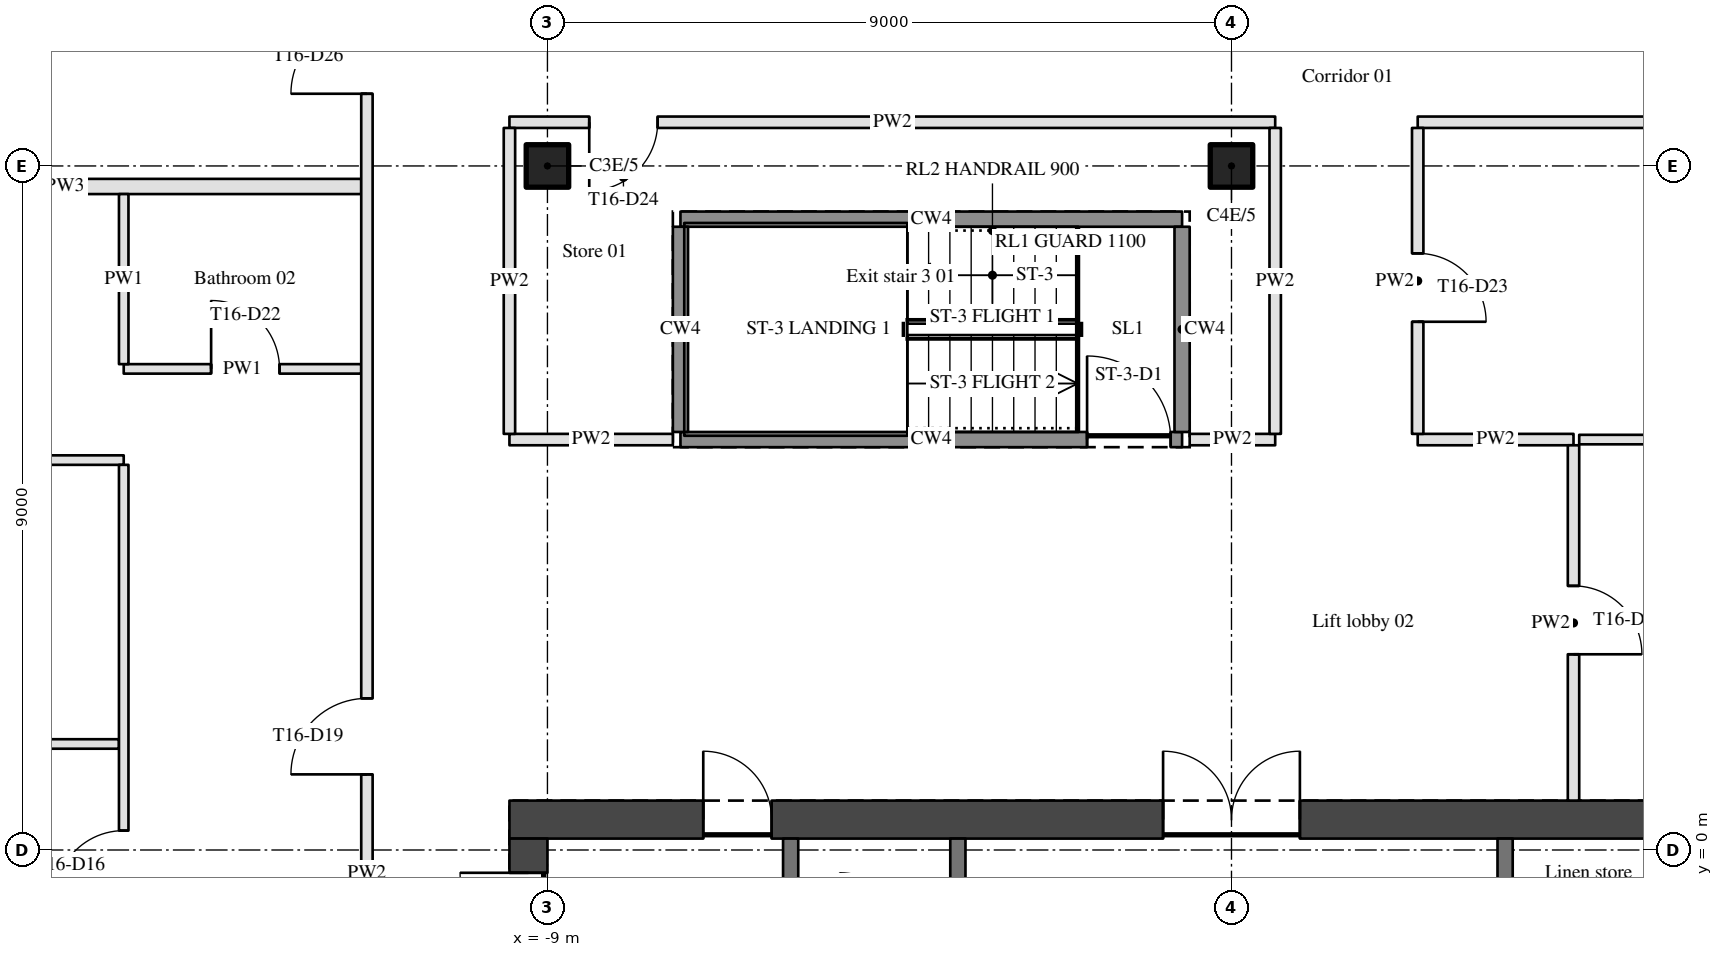
"""IFC4 building model, lengths in metres.
Left out: names, types, materials, properties, quantities, classifications, styles, units other than length and angle.
Written with IfcOpenShell. Run it as: python <this file> out.ifc"""

import sys

from ifc_helpers import new_model, si_unit, direction, frame, frame_2d, origin, origin_2d, place, context, subcontext, project, spatial, rectangle, hollow_circle, extrude, element, fill, save


model = new_model("IFC4")
c1 = context("Model", 3, precision=1e-05, world=origin(), true_north=direction((0.0, 1.0)))
c2 = subcontext(c1, "Body", "Model", "MODEL_VIEW")
j1 = project(units=[si_unit("LENGTHUNIT", "METRE"), si_unit("PLANEANGLEUNIT", "RADIAN")], contexts=[c1])
p1 = place(None, origin())
s1 = spatial("IfcSite", under=j1, at=p1, CompositionType="ELEMENT")
p2 = place(p1, origin())
s2 = spatial("IfcBuilding", under=s1, at=p2, CompositionType="ELEMENT")
p3 = place(p2, frame((0.0, 0.0, 217.2)))
s3 = spatial("IfcBuildingStorey", under=s2, at=p3, CompositionType="ELEMENT", Elevation=217.2)
for number, where, z_axis, x_axis in (
    (1, (-9.0, 9.0, 0.0), (0.0, 0.0, 1.0), (1.0, 0.0, 0.0)),
    (2, (0.0, 9.0, 0.0), (0.0, 0.0, 1.0), (1.0, 0.0, 0.0)),
):
    element("IfcColumn", number, at=place(p3, frame(where, z_axis=z_axis, x_axis=x_axis)), inside=s3, PredefinedType="COLUMN", context=c2, shape_type="SweptSolid", body=[
        extrude(hollow_circle(Radius=0.28, WallThickness=0.025, at=origin_2d()), origin(), (0.0, 0.0, 1.0), 3.15),
    ])
p4 = place(p3, frame((-9.5, 0.4, 0.0), z_axis=(0.0, 0.0, 1.0), x_axis=(1.0, 0.0, 0.0)))
e3 = element("IfcWall", 3, at=p4, inside=s3, PredefinedType="SHEAR", context=c2, shape_type="SweptSolid", body=[
    extrude(rectangle(XDim=19.0, YDim=0.5, at=frame_2d((9.5, 0.0))), origin(), (0.0, 0.0, 1.0), 3.15),
])
p5 = place(p4, frame((8.6, 0.0, 0.0)))
e4 = element("IfcOpeningElement", 4, at=p5, cuts=e3, PredefinedType="OPENING", context=c2, shape_type="SweptSolid", body=[
    extrude(rectangle(XDim=1.8, YDim=2.1, at=frame_2d((0.9, 1.05))), frame((0.0, 0.26, 0.0), z_axis=(0.0, -1.0, 0.0), x_axis=(1.0, 0.0, 0.0)), (0.0, 0.0, 1.0), 0.52),
])
p6 = place(p4, frame((2.55, 0.0, 0.0)))
e5 = element("IfcOpeningElement", 5, at=p6, cuts=e3, PredefinedType="OPENING", context=c2, shape_type="SweptSolid", body=[
    extrude(rectangle(XDim=0.9, YDim=2.1, at=frame_2d((0.45, 1.05))), frame((0.0, 0.26, 0.0), z_axis=(0.0, -1.0, 0.0), x_axis=(1.0, 0.0, 0.0)), (0.0, 0.0, 1.0), 0.52),
])
p7 = place(p3, frame((-9.25, -11.5, 0.0), z_axis=(0.0, 0.0, 1.0), x_axis=(0.0, 1.0, 0.0)))
e6 = element("IfcWall", 6, at=p7, inside=s3, PredefinedType="SHEAR", context=c2, shape_type="SweptSolid", body=[
    extrude(rectangle(XDim=11.65, YDim=0.5, at=frame_2d((5.825, 0.0))), origin(), (0.0, 0.0, 1.0), 3.15),
])
p8 = place(p7, frame((9.4, 0.0, 0.0)))
e7 = element("IfcOpeningElement", 7, at=p8, cuts=e6, PredefinedType="OPENING", context=c2, shape_type="SweptSolid", body=[
    extrude(rectangle(XDim=1.8, YDim=2.1, at=frame_2d((0.9, 1.05))), frame((0.0, 0.26, 0.0), z_axis=(0.0, -1.0, 0.0), x_axis=(1.0, 0.0, 0.0)), (0.0, 0.0, 1.0), 0.52),
])
p9 = place(p3, frame((-19.241, 1.395, 0.0), z_axis=(0.0, 0.0, 1.0), x_axis=(1.0, 0.0, 0.0)))
e8 = element("IfcWall", 8, at=p9, inside=s3, PredefinedType="PARTITIONING", context=c2, shape_type="SweptSolid", body=[
    extrude(rectangle(XDim=4.604, YDim=0.125, at=frame_2d((2.302, 0.0))), origin(), (0.0, 0.0, 1.0), 2.21),
])
p10 = place(p3, frame((-14.575, 5.13, 0.0), z_axis=(0.0, 0.0, 1.0), x_axis=(-1.0, 0.0, 0.0)))
e9 = element("IfcWall", 9, at=p10, inside=s3, PredefinedType="PARTITIONING", context=c2, shape_type="SweptSolid", body=[
    extrude(rectangle(XDim=7.36, YDim=0.125, at=frame_2d((3.68, 0.0))), origin(), (0.0, 0.0, 1.0), 2.21),
])
p11 = place(p10, frame((3.23, 0.0, 0.0)))
e10 = element("IfcOpeningElement", 10, at=p11, cuts=e9, PredefinedType="OPENING", context=c2, shape_type="SweptSolid", body=[
    extrude(rectangle(XDim=0.9, YDim=2.1, at=frame_2d((0.45, 1.05))), frame((0.0, 0.073, 0.0), z_axis=(0.0, -1.0, 0.0), x_axis=(1.0, 0.0, 0.0)), (0.0, 0.0, 1.0), 0.145),
])
p12 = place(p3, frame((-9.5, 5.4, 0.0), z_axis=(0.0, 0.0, 1.0), x_axis=(1.0, 0.0, 0.0)))
e11 = element("IfcWall", 11, at=p12, inside=s3, PredefinedType="PARTITIONING", context=c2, shape_type="SweptSolid", body=[
    extrude(rectangle(XDim=2.15, YDim=0.15, at=frame_2d((1.075, 0.0))), origin(), (0.0, 0.0, 1.0), 2.21),
])
p13 = place(p3, frame((-7.25, 5.4, 0.0), z_axis=(0.0, 0.0, 1.0), x_axis=(1.0, 0.0, 0.0)))
e12 = element("IfcWall", 12, at=p13, inside=s3, PredefinedType="SHEAR", context=c2, shape_type="SweptSolid", body=[
    extrude(rectangle(XDim=6.6, YDim=0.2, at=frame_2d((3.3, 0.0))), origin(), (0.0, 0.0, 1.0), 3.15),
])
p14 = place(p13, frame((5.35, 0.0, 0.0)))
e13 = element("IfcOpeningElement", 13, at=p14, cuts=e12, PredefinedType="OPENING", context=c2, shape_type="SweptSolid", body=[
    extrude(rectangle(XDim=1.1, YDim=2.1, at=frame_2d((0.55, 1.05))), frame((0.0, 0.11, 0.0), z_axis=(0.0, -1.0, 0.0), x_axis=(1.0, 0.0, 0.0)), (0.0, 0.0, 1.0), 0.22),
])
p15 = place(p3, frame((-0.55, 5.4, 0.0), z_axis=(0.0, 0.0, 1.0), x_axis=(1.0, 0.0, 0.0)))
e14 = element("IfcWall", 14, at=p15, inside=s3, PredefinedType="PARTITIONING", context=c2, shape_type="SweptSolid", body=[
    extrude(rectangle(XDim=1.125, YDim=0.15, at=frame_2d((0.562, 0.0))), origin(), (0.0, 0.0, 1.0), 2.21),
])
p16 = place(p3, frame((2.45, 5.4, 0.0), z_axis=(0.0, 0.0, 1.0), x_axis=(1.0, 0.0, 0.0)))
e15 = element("IfcWall", 15, at=p16, inside=s3, PredefinedType="PARTITIONING", context=c2, shape_type="SweptSolid", body=[
    extrude(rectangle(XDim=2.05, YDim=0.15, at=frame_2d((1.025, 0.0))), origin(), (0.0, 0.0, 1.0), 2.21),
])
p17 = place(p3, frame((4.575, 5.4, 0.0), z_axis=(0.0, 0.0, 1.0), x_axis=(1.0, 0.0, 0.0)))
e16 = element("IfcWall", 16, at=p17, inside=s3, PredefinedType="PARTITIONING", context=c2, shape_type="SweptSolid", body=[
    extrude(rectangle(XDim=4.863, YDim=0.125, at=frame_2d((2.431, 0.0))), origin(), (0.0, 0.0, 1.0), 2.21),
])
p18 = place(p3, frame((-14.575, 6.33, 0.0), z_axis=(0.0, 0.0, 1.0), x_axis=(1.0, 0.0, 0.0)))
e17 = element("IfcWall", 17, at=p18, inside=s3, PredefinedType="PARTITIONING", context=c2, shape_type="SweptSolid", body=[
    extrude(rectangle(XDim=3.125, YDim=0.125, at=frame_2d((1.562, 0.0))), origin(), (0.0, 0.0, 1.0), 2.21),
])
p19 = place(p18, frame((1.15, 0.0, 0.0)))
e18 = element("IfcOpeningElement", 18, at=p19, cuts=e17, PredefinedType="OPENING", context=c2, shape_type="SweptSolid", body=[
    extrude(rectangle(XDim=0.9, YDim=2.1, at=frame_2d((0.45, 1.05))), frame((0.0, 0.073, 0.0), z_axis=(0.0, -1.0, 0.0), x_axis=(1.0, 0.0, 0.0)), (0.0, 0.0, 1.0), 0.145),
])
p20 = place(p3, frame((-7.25, 8.3, 0.0), z_axis=(0.0, 0.0, 1.0), x_axis=(1.0, 0.0, 0.0)))
e19 = element("IfcWall", 19, at=p20, inside=s3, PredefinedType="SHEAR", context=c2, shape_type="SweptSolid", body=[
    extrude(rectangle(XDim=6.6, YDim=0.2, at=frame_2d((3.3, 0.0))), origin(), (0.0, 0.0, 1.0), 3.15),
])
p21 = place(p3, frame((-19.241, 8.73, 0.0), z_axis=(0.0, 0.0, 1.0), x_axis=(1.0, 0.0, 0.0)))
e20 = element("IfcWall", 20, at=p21, inside=s3, PredefinedType="PARTITIONING", context=c2, shape_type="SweptSolid", body=[
    extrude(rectangle(XDim=7.791, YDim=0.2, at=frame_2d((3.896, 0.0))), origin(), (0.0, 0.0, 1.0), 2.21),
])
p22 = place(p3, frame((0.575, 9.575, 0.0), z_axis=(0.0, 0.0, 1.0), x_axis=(-1.0, 0.0, 0.0)))
e21 = element("IfcWall", 21, at=p22, inside=s3, PredefinedType="PARTITIONING", context=c2, shape_type="SweptSolid", body=[
    extrude(rectangle(XDim=10.075, YDim=0.15, at=frame_2d((5.038, 0.0))), origin(), (0.0, 0.0, 1.0), 2.21),
])
p23 = place(p22, frame((8.125, 0.0, 0.0)))
e22 = element("IfcOpeningElement", 22, at=p23, cuts=e21, PredefinedType="OPENING", context=c2, shape_type="SweptSolid", body=[
    extrude(rectangle(XDim=0.9, YDim=2.1, at=frame_2d((0.45, 1.05))), frame((0.0, 0.085, 0.0), z_axis=(0.0, -1.0, 0.0), x_axis=(1.0, 0.0, 0.0)), (0.0, 0.0, 1.0), 0.17),
])
p24 = place(p3, frame((11.3, 9.575, 0.0), z_axis=(0.0, 0.0, 1.0), x_axis=(-1.0, 0.0, 0.0)))
e23 = element("IfcWall", 23, at=p24, inside=s3, PredefinedType="PARTITIONING", context=c2, shape_type="SweptSolid", body=[
    extrude(rectangle(XDim=8.85, YDim=0.15, at=frame_2d((4.425, 0.0))), origin(), (0.0, 0.0, 1.0), 2.21),
])
p25 = place(p24, frame((0.4, 0.0, 0.0)))
e24 = element("IfcOpeningElement", 24, at=p25, cuts=e23, PredefinedType="OPENING", context=c2, shape_type="SweptSolid", body=[
    extrude(rectangle(XDim=1.0, YDim=2.1, at=frame_2d((0.5, 1.05))), frame((0.0, 0.085, 0.0), z_axis=(0.0, -1.0, 0.0), x_axis=(1.0, 0.0, 0.0)), (0.0, 0.0, 1.0), 0.17),
])
p26 = place(p3, frame((-14.575, -13.208, 0.0), z_axis=(0.0, 0.0, 1.0), x_axis=(0.0, 1.0, 0.0)))
e25 = element("IfcWall", 25, at=p26, inside=s3, PredefinedType="PARTITIONING", context=c2, shape_type="SweptSolid", body=[
    extrude(rectangle(XDim=18.275, YDim=0.125, at=frame_2d((9.137, 0.0))), origin(), (0.0, 0.0, 1.0), 2.21),
])
p27 = place(p26, frame((3.367, 0.0, 0.0)))
e26 = element("IfcOpeningElement", 26, at=p27, cuts=e25, PredefinedType="OPENING", context=c2, shape_type="SweptSolid", body=[
    extrude(rectangle(XDim=1.0, YDim=2.1, at=frame_2d((0.5, 1.05))), frame((0.0, 0.073, 0.0), z_axis=(0.0, -1.0, 0.0), x_axis=(1.0, 0.0, 0.0)), (0.0, 0.0, 1.0), 0.145),
])
p28 = place(p26, frame((5.518, 0.0, 0.0)))
e27 = element("IfcOpeningElement", 27, at=p28, cuts=e25, PredefinedType="OPENING", context=c2, shape_type="SweptSolid", body=[
    extrude(rectangle(XDim=0.9, YDim=2.1, at=frame_2d((0.45, 1.05))), frame((0.0, 0.073, 0.0), z_axis=(0.0, -1.0, 0.0), x_axis=(1.0, 0.0, 0.0)), (0.0, 0.0, 1.0), 0.145),
])
p29 = place(p26, frame((12.562, 0.0, 0.0)))
e28 = element("IfcOpeningElement", 28, at=p29, cuts=e25, PredefinedType="OPENING", context=c2, shape_type="SweptSolid", body=[
    extrude(rectangle(XDim=0.9, YDim=2.1, at=frame_2d((0.45, 1.05))), frame((0.0, 0.073, 0.0), z_axis=(0.0, -1.0, 0.0), x_axis=(1.0, 0.0, 0.0)), (0.0, 0.0, 1.0), 0.145),
])
p30 = place(p26, frame((10.145, 0.0, 0.0)))
e29 = element("IfcOpeningElement", 29, at=p30, cuts=e25, PredefinedType="OPENING", context=c2, shape_type="SweptSolid", body=[
    extrude(rectangle(XDim=1.0, YDim=2.1, at=frame_2d((0.5, 1.05))), frame((0.0, 0.073, 0.0), z_axis=(0.0, -1.0, 0.0), x_axis=(1.0, 0.0, 0.0)), (0.0, 0.0, 1.0), 0.145),
])
p31 = place(p26, frame((8.117, 0.0, 0.0)))
e30 = element("IfcOpeningElement", 30, at=p31, cuts=e25, PredefinedType="OPENING", context=c2, shape_type="SweptSolid", body=[
    extrude(rectangle(XDim=0.9, YDim=2.1, at=frame_2d((0.45, 1.05))), frame((0.0, 0.073, 0.0), z_axis=(0.0, -1.0, 0.0), x_axis=(1.0, 0.0, 0.0)), (0.0, 0.0, 1.0), 0.145),
])
p32 = place(p3, frame((-14.575, 6.393, 0.0), z_axis=(0.0, 0.0, 1.0), x_axis=(0.0, 1.0, 0.0)))
e31 = element("IfcWall", 31, at=p32, inside=s3, PredefinedType="PARTITIONING", context=c2, shape_type="SweptSolid", body=[
    extrude(rectangle(XDim=2.237, YDim=0.125, at=frame_2d((1.119, 0.0))), origin(), (0.0, 0.0, 1.0), 2.21),
])
p33 = place(p3, frame((-11.375, -11.925, 0.0), z_axis=(0.0, 0.0, 1.0), x_axis=(0.0, 1.0, 0.0)))
e32 = element("IfcWall", 32, at=p33, inside=s3, PredefinedType="PARTITIONING", context=c2, shape_type="SweptSolid", body=[
    extrude(rectangle(XDim=23.25, YDim=0.15, at=frame_2d((11.625, 0.0))), origin(), (0.0, 0.0, 1.0), 2.21),
])
p34 = place(p33, frame((1.155, 0.0, 0.0)))
e33 = element("IfcOpeningElement", 33, at=p34, cuts=e32, PredefinedType="OPENING", context=c2, shape_type="SweptSolid", body=[
    extrude(rectangle(XDim=1.0, YDim=2.1, at=frame_2d((0.5, 1.05))), frame((0.0, 0.085, 0.0), z_axis=(0.0, -1.0, 0.0), x_axis=(1.0, 0.0, 0.0)), (0.0, 0.0, 1.0), 0.17),
])
p35 = place(p33, frame((12.92, 0.0, 0.0)))
e34 = element("IfcOpeningElement", 34, at=p35, cuts=e32, PredefinedType="OPENING", context=c2, shape_type="SweptSolid", body=[
    extrude(rectangle(XDim=1.0, YDim=2.1, at=frame_2d((0.5, 1.05))), frame((0.0, 0.085, 0.0), z_axis=(0.0, -1.0, 0.0), x_axis=(1.0, 0.0, 0.0)), (0.0, 0.0, 1.0), 0.17),
])
p36 = place(p33, frame((21.875, 0.0, 0.0)))
e35 = element("IfcOpeningElement", 35, at=p36, cuts=e32, PredefinedType="OPENING", context=c2, shape_type="SweptSolid", body=[
    extrude(rectangle(XDim=1.0, YDim=2.1, at=frame_2d((0.5, 1.05))), frame((0.0, 0.085, 0.0), z_axis=(0.0, -1.0, 0.0), x_axis=(1.0, 0.0, 0.0)), (0.0, 0.0, 1.0), 0.17),
])
p37 = place(p3, frame((-9.5, 5.475, 0.0), z_axis=(0.0, 0.0, 1.0), x_axis=(0.0, 1.0, 0.0)))
e36 = element("IfcWall", 36, at=p37, inside=s3, PredefinedType="PARTITIONING", context=c2, shape_type="SweptSolid", body=[
    extrude(rectangle(XDim=4.025, YDim=0.15, at=frame_2d((2.012, 0.0))), origin(), (0.0, 0.0, 1.0), 2.21),
])
p38 = place(p3, frame((-7.25, 5.5, 0.0), z_axis=(0.0, 0.0, 1.0), x_axis=(0.0, 1.0, 0.0)))
e37 = element("IfcWall", 37, at=p38, inside=s3, PredefinedType="SHEAR", context=c2, shape_type="SweptSolid", body=[
    extrude(rectangle(XDim=2.7, YDim=0.2, at=frame_2d((1.35, 0.0))), origin(), (0.0, 0.0, 1.0), 3.15),
])
for number, where, z_axis, x_axis in (
    (38, (-5.8, -1.1, 0.0), (0.0, 0.0, 1.0), (0.0, 1.0, 0.0)),
    (39, (-3.6, -1.1, 0.0), (0.0, 0.0, 1.0), (0.0, 1.0, 0.0)),
):
    element("IfcWall", number, at=place(p3, frame(where, z_axis=z_axis, x_axis=x_axis)), inside=s3, PredefinedType="SOLIDWALL", context=c2, shape_type="SweptSolid", body=[
        extrude(rectangle(XDim=1.25, YDim=0.2, at=frame_2d((0.625, 0.0))), origin(), (0.0, 0.0, 1.0), 2.85),
    ])
p39 = place(p3, frame((-0.65, 5.5, 0.0), z_axis=(0.0, 0.0, 1.0), x_axis=(0.0, 1.0, 0.0)))
e40 = element("IfcWall", 40, at=p39, inside=s3, PredefinedType="SHEAR", context=c2, shape_type="SweptSolid", body=[
    extrude(rectangle(XDim=2.7, YDim=0.2, at=frame_2d((1.35, 0.0))), origin(), (0.0, 0.0, 1.0), 3.15),
])
p40 = place(p3, frame((0.575, 5.475, 0.0), z_axis=(0.0, 0.0, 1.0), x_axis=(0.0, 1.0, 0.0)))
e41 = element("IfcWall", 41, at=p40, inside=s3, PredefinedType="PARTITIONING", context=c2, shape_type="SweptSolid", body=[
    extrude(rectangle(XDim=4.025, YDim=0.15, at=frame_2d((2.012, 0.0))), origin(), (0.0, 0.0, 1.0), 2.21),
])
p41 = place(p3, frame((2.45, 9.5, 0.0), z_axis=(0.0, 0.0, 1.0), x_axis=(0.0, -1.0, 0.0)))
e42 = element("IfcWall", 42, at=p41, inside=s3, PredefinedType="PARTITIONING", context=c2, shape_type="SweptSolid", body=[
    extrude(rectangle(XDim=4.025, YDim=0.15, at=frame_2d((2.012, 0.0))), origin(), (0.0, 0.0, 1.0), 2.21),
])
p42 = place(p41, frame((1.65, 0.0, 0.0)))
e43 = element("IfcOpeningElement", 43, at=p42, cuts=e42, PredefinedType="OPENING", context=c2, shape_type="SweptSolid", body=[
    extrude(rectangle(XDim=0.9, YDim=2.1, at=frame_2d((0.45, 1.05))), frame((0.0, 0.085, 0.0), z_axis=(0.0, -1.0, 0.0), x_axis=(1.0, 0.0, 0.0)), (0.0, 0.0, 1.0), 0.17),
])
p43 = place(p3, frame((3.6, -1.1, 0.0), z_axis=(0.0, 0.0, 1.0), x_axis=(0.0, 1.0, 0.0)))
e44 = element("IfcWall", 44, at=p43, inside=s3, PredefinedType="SOLIDWALL", context=c2, shape_type="SweptSolid", body=[
    extrude(rectangle(XDim=1.25, YDim=0.2, at=frame_2d((0.625, 0.0))), origin(), (0.0, 0.0, 1.0), 2.85),
])
p44 = place(p3, frame((4.5, 5.325, 0.0), z_axis=(0.0, 0.0, 1.0), x_axis=(0.0, -1.0, 0.0)))
e45 = element("IfcWall", 45, at=p44, inside=s3, PredefinedType="PARTITIONING", context=c2, shape_type="SweptSolid", body=[
    extrude(rectangle(XDim=4.675, YDim=0.15, at=frame_2d((2.337, 0.0))), origin(), (0.0, 0.0, 1.0), 2.21),
])
p45 = place(p44, frame((1.85, 0.0, 0.0)))
e46 = element("IfcOpeningElement", 46, at=p45, cuts=e45, PredefinedType="OPENING", context=c2, shape_type="SweptSolid", body=[
    extrude(rectangle(XDim=0.9, YDim=2.1, at=frame_2d((0.45, 1.05))), frame((0.0, 0.085, 0.0), z_axis=(0.0, -1.0, 0.0), x_axis=(1.0, 0.0, 0.0)), (0.0, 0.0, 1.0), 0.17),
])
p46 = place(p35, origin())
e47 = element("IfcDoor", 47, at=p46, inside=s3, OperationType="SINGLE_SWING_LEFT", PredefinedType="DOOR", context=c2, shape_type="SweptSolid", body=[
    extrude(rectangle(XDim=1.0, YDim=2.1, at=frame_2d((0.5, 1.05))), frame((0.0, 0.025, 0.0), z_axis=(0.0, -1.0, 0.0), x_axis=(1.0, 0.0, 0.0)), (0.0, 0.0, 1.0), 0.05),
])
fill(e34, e47)
p47 = place(p8, origin())
e48 = element("IfcDoor", 48, at=p47, inside=s3, OperationType="DOUBLE_DOOR_SINGLE_SWING", PredefinedType="DOOR", context=c2, shape_type="SweptSolid", body=[
    extrude(rectangle(XDim=1.8, YDim=2.1, at=frame_2d((0.9, 1.05))), frame((0.0, 0.025, 0.0), z_axis=(0.0, -1.0, 0.0), x_axis=(1.0, 0.0, 0.0)), (0.0, 0.0, 1.0), 0.05),
])
fill(e7, e48)
p48 = place(p36, origin())
e49 = element("IfcDoor", 49, at=p48, inside=s3, OperationType="SINGLE_SWING_LEFT", PredefinedType="DOOR", context=c2, shape_type="SweptSolid", body=[
    extrude(rectangle(XDim=1.0, YDim=2.1, at=frame_2d((0.5, 1.05))), frame((0.0, 0.025, 0.0), z_axis=(0.0, -1.0, 0.0), x_axis=(1.0, 0.0, 0.0)), (0.0, 0.0, 1.0), 0.05),
])
fill(e35, e49)
p49 = place(p5, origin())
e50 = element("IfcDoor", 50, at=p49, inside=s3, OperationType="DOUBLE_DOOR_SINGLE_SWING", PredefinedType="DOOR", context=c2, shape_type="SweptSolid", body=[
    extrude(rectangle(XDim=1.8, YDim=2.1, at=frame_2d((0.9, 1.05))), frame((0.0, 0.025, 0.0), z_axis=(0.0, -1.0, 0.0), x_axis=(1.0, 0.0, 0.0)), (0.0, 0.0, 1.0), 0.05),
])
fill(e4, e50)
p50 = place(p14, origin())
e51 = element("IfcDoor", 51, at=p50, inside=s3, OperationType="SINGLE_SWING_LEFT", PredefinedType="DOOR", context=c2, shape_type="SweptSolid", body=[
    extrude(rectangle(XDim=1.1, YDim=2.1, at=frame_2d((0.55, 1.05))), frame((0.0, 0.025, 0.0), z_axis=(0.0, -1.0, 0.0), x_axis=(1.0, 0.0, 0.0)), (0.0, 0.0, 1.0), 0.05),
])
fill(e13, e51)
p51 = place(p19, origin())
e52 = element("IfcDoor", 52, at=p51, inside=s3, OperationType="SINGLE_SWING_LEFT", PredefinedType="DOOR", context=c2, shape_type="SweptSolid", body=[
    extrude(rectangle(XDim=0.9, YDim=2.1, at=frame_2d((0.45, 1.05))), frame((0.0, 0.025, 0.0), z_axis=(0.0, -1.0, 0.0), x_axis=(1.0, 0.0, 0.0)), (0.0, 0.0, 1.0), 0.05),
])
fill(e18, e52)
p52 = place(p29, origin())
e53 = element("IfcDoor", 53, at=p52, inside=s3, OperationType="SINGLE_SWING_LEFT", PredefinedType="DOOR", context=c2, shape_type="SweptSolid", body=[
    extrude(rectangle(XDim=0.9, YDim=2.1, at=frame_2d((0.45, 1.05))), frame((0.0, 0.025, 0.0), z_axis=(0.0, -1.0, 0.0), x_axis=(1.0, 0.0, 0.0)), (0.0, 0.0, 1.0), 0.05),
])
fill(e28, e53)
p53 = place(p42, origin())
e54 = element("IfcDoor", 54, at=p53, inside=s3, OperationType="SINGLE_SWING_RIGHT", PredefinedType="DOOR", context=c2, shape_type="SweptSolid", body=[
    extrude(rectangle(XDim=0.9, YDim=2.1, at=frame_2d((0.45, 1.05))), frame((0.0, 0.025, 0.0), z_axis=(0.0, -1.0, 0.0), x_axis=(1.0, 0.0, 0.0)), (0.0, 0.0, 1.0), 0.05),
])
fill(e43, e54)
p54 = place(p23, origin())
e55 = element("IfcDoor", 55, at=p54, inside=s3, OperationType="SINGLE_SWING_RIGHT", PredefinedType="DOOR", context=c2, shape_type="SweptSolid", body=[
    extrude(rectangle(XDim=0.9, YDim=2.1, at=frame_2d((0.45, 1.05))), frame((0.0, 0.025, 0.0), z_axis=(0.0, -1.0, 0.0), x_axis=(1.0, 0.0, 0.0)), (0.0, 0.0, 1.0), 0.05),
])
fill(e22, e55)
p55 = place(p45, origin())
e56 = element("IfcDoor", 56, at=p55, inside=s3, OperationType="SINGLE_SWING_RIGHT", PredefinedType="DOOR", context=c2, shape_type="SweptSolid", body=[
    extrude(rectangle(XDim=0.9, YDim=2.1, at=frame_2d((0.45, 1.05))), frame((0.0, 0.025, 0.0), z_axis=(0.0, -1.0, 0.0), x_axis=(1.0, 0.0, 0.0)), (0.0, 0.0, 1.0), 0.05),
])
fill(e46, e56)
p56 = place(p6, origin())
e57 = element("IfcDoor", 57, at=p56, inside=s3, OperationType="SINGLE_SWING_LEFT", PredefinedType="DOOR", context=c2, shape_type="SweptSolid", body=[
    extrude(rectangle(XDim=0.9, YDim=2.1, at=frame_2d((0.45, 1.05))), frame((0.0, 0.025, 0.0), z_axis=(0.0, -1.0, 0.0), x_axis=(1.0, 0.0, 0.0)), (0.0, 0.0, 1.0), 0.05),
])
fill(e5, e57)
save(model, sys.argv[1])
